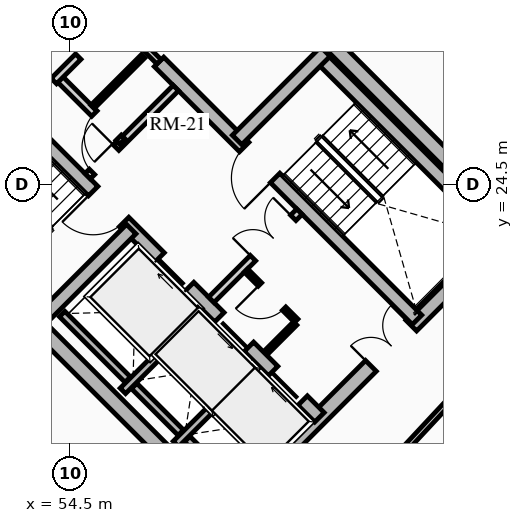
"""IFC4 building model, lengths in metres.
Left out: names, types, materials, properties, quantities, classifications, styles, units other than length and angle.
Written with IfcOpenShell. Run it as: python <this file> out.ifc"""

import sys

from ifc_helpers import new_model, si_unit, direction, frame, frame_2d, origin, place, context, subcontext, project, spatial, rectangle, extrude, source, transform, mapped, element, fill, save


model = new_model("IFC4")
c1 = context("Model", 3, precision=1e-05, world=origin(), true_north=direction((0.0, 1.0)))
c2 = subcontext(c1, "Body", "Model", "MODEL_VIEW")
j1 = project(units=[si_unit("LENGTHUNIT", "METRE"), si_unit("PLANEANGLEUNIT", "RADIAN")], contexts=[c1])
p1 = place(None, origin())
s1 = spatial("IfcSite", under=j1, at=p1, CompositionType="ELEMENT")
p2 = place(p1, origin())
s2 = spatial("IfcBuilding", under=s1, at=p2, CompositionType="ELEMENT")
p3 = place(p2, frame((0.0, 0.0, 226.05)))
s3 = spatial("IfcBuildingStorey", under=s2, at=p3, CompositionType="ELEMENT", Elevation=226.05)
for number, where, z_axis, x_axis in (
    (1, (58.702, 15.732, 0.0), (0.0, 0.0, 1.0), (-0.707, 0.707, 0.0)),
    (2, (66.268, 23.298, 0.0), (0.0, 0.0, 1.0), (-0.707, 0.707, 0.0)),
):
    element("IfcWall", number, at=place(p3, frame(where, z_axis=z_axis, x_axis=x_axis)), inside=s3, PredefinedType="SHEAR", context=c2, shape_type="SweptSolid", body=[
        extrude(rectangle(XDim=14.1, YDim=0.4, at=frame_2d((7.05, 0.0))), origin(), (0.0, 0.0, 1.0), 3.2),
    ])
p4 = place(p3, frame((58.561, 15.873, 0.0), z_axis=(0.0, 0.0, 1.0), x_axis=(0.707106781187, 0.707106781187, 0.0)))
e3 = element("IfcWall", 3, at=p4, inside=s3, PredefinedType="SHEAR", context=c2, shape_type="SweptSolid", body=[
    extrude(rectangle(XDim=10.7, YDim=0.4, at=frame_2d((5.35, 0.0))), origin(), (0.0, 0.0, 1.0), 3.2),
])
m1 = source(origin(), c2, "Body", "SweptSolid", [
    extrude(rectangle(XDim=1.5, YDim=2.02, at=frame_2d((0.75, 1.01))), frame((0.0, 0.21, 0.0), z_axis=(0.0, -1.0, 0.0), x_axis=(1.0, 0.0, 0.0)), (0.0, 0.0, 1.0), 0.42),
])
p5 = place(p4, frame((5.45, 0.0, 0.0)))
e4 = element("IfcOpeningElement", 4, at=p5, cuts=e3, PredefinedType="OPENING", context=c2, shape_type="MappedRepresentation", body=[
    mapped(m1, transform((0.0, 0.0, 0.0), x_axis=(1.0, 0.0, 0.0), y_axis=(0.0, 1.0, 0.0), z_axis=(0.0, 0.0, 1.0), scale=1.0)),
])
p6 = place(p3, frame((48.873, 25.561, 0.0), z_axis=(0.0, 0.0, 1.0), x_axis=(0.707106781187, 0.707106781187, 0.0)))
e5 = element("IfcWall", 5, at=p6, inside=s3, PredefinedType="SHEAR", context=c2, shape_type="SweptSolid", body=[
    extrude(rectangle(XDim=10.7, YDim=0.4, at=frame_2d((5.35, 0.0))), origin(), (0.0, 0.0, 1.0), 3.2),
])
p7 = place(p6, frame((4.6, 0.0, 0.0)))
e6 = element("IfcOpeningElement", 6, at=p7, cuts=e5, PredefinedType="OPENING", context=c2, shape_type="MappedRepresentation", body=[
    mapped(m1, transform((0.0, 0.0, 0.0), x_axis=(1.0, 0.0, 0.0), y_axis=(0.0, 1.0, 0.0), z_axis=(0.0, 0.0, 1.0), scale=1.0)),
])
p8 = place(p3, frame((61.06, 18.373, 0.0), z_axis=(0.0, 0.0, 1.0), x_axis=(-0.707106781187, 0.707106781187, 0.0)))
e7 = element("IfcWall", 7, at=p8, inside=s3, PredefinedType="SHEAR", context=c2, shape_type="SweptSolid", body=[
    extrude(rectangle(XDim=13.7, YDim=0.35, at=frame_2d((6.85, 0.0))), origin(), (0.0, 0.0, 1.0), 3.2),
])
m2 = source(origin(), c2, "Body", "SweptSolid", [
    extrude(rectangle(XDim=1.1, YDim=2.015, at=frame_2d((0.55, 1.007))), frame((0.0, 0.185, 0.0), z_axis=(0.0, -1.0, 0.0), x_axis=(1.0, 0.0, 0.0)), (0.0, 0.0, 1.0), 0.37),
])
p9 = place(p8, frame((4.85, 0.0, 0.0)))
e8 = element("IfcOpeningElement", 8, at=p9, cuts=e7, PredefinedType="OPENING", context=c2, shape_type="MappedRepresentation", body=[
    mapped(m2, transform((0.0, 0.0, 0.0), x_axis=(1.0, 0.0, 0.0), y_axis=(0.0, 1.0, 0.0), z_axis=(0.0, 0.0, 1.0), scale=1.0)),
])
p10 = place(p8, frame((0.625, 0.0, 0.0)))
e9 = element("IfcOpeningElement", 9, at=p10, cuts=e7, PredefinedType="OPENING", context=c2, shape_type="MappedRepresentation", body=[
    mapped(m2, transform((0.0, 0.0, 0.0), x_axis=(1.0, 0.0, 0.0), y_axis=(0.0, 1.0, 0.0), z_axis=(0.0, 0.0, 1.0), scale=1.0)),
])
p11 = place(p8, frame((2.625, 0.0, 0.0)))
e10 = element("IfcOpeningElement", 10, at=p11, cuts=e7, PredefinedType="OPENING", context=c2, shape_type="MappedRepresentation", body=[
    mapped(m2, transform((0.0, 0.0, 0.0), x_axis=(1.0, 0.0, 0.0), y_axis=(0.0, 1.0, 0.0), z_axis=(0.0, 0.0, 1.0), scale=1.0)),
])
m3 = source(origin(), c2, "Body", "SweptSolid", [
    extrude(rectangle(XDim=1.15, YDim=2.02, at=frame_2d((0.575, 1.01))), frame((0.0, 0.185, 0.0), z_axis=(0.0, -1.0, 0.0), x_axis=(1.0, 0.0, 0.0)), (0.0, 0.0, 1.0), 0.37),
])
p12 = place(p8, frame((7.27, 0.0, 0.0)))
e11 = element("IfcOpeningElement", 11, at=p12, cuts=e7, PredefinedType="OPENING", context=c2, shape_type="MappedRepresentation", body=[
    mapped(m3, transform((0.0, 0.0, 0.0), x_axis=(1.0, 0.0, 0.0), y_axis=(0.0, 1.0, 0.0), z_axis=(0.0, 0.0, 1.0), scale=1.0)),
])
p13 = place(p3, frame((63.627, 20.94, 0.0), z_axis=(0.0, 0.0, 1.0), x_axis=(-0.707119496762, 0.707094065383, 0.0)))
e12 = element("IfcWall", 12, at=p13, inside=s3, PredefinedType="SHEAR", context=c2, shape_type="SweptSolid", body=[
    extrude(rectangle(XDim=9.6, YDim=0.35, at=frame_2d((4.8, 0.0))), origin(), (0.0, 0.0, 1.0), 3.2),
])
p14 = place(p13, frame((5.28, 0.0, 0.0)))
e13 = element("IfcOpeningElement", 13, at=p14, cuts=e12, PredefinedType="OPENING", context=c2, shape_type="MappedRepresentation", body=[
    mapped(m3, transform((0.0, 0.0, 0.0), x_axis=(1.0, 0.0, 0.0), y_axis=(0.0, 1.0, 0.0), z_axis=(0.0, 0.0, 1.0), scale=1.0)),
])
p15 = place(p3, frame((53.922, 21.141, 0.0), z_axis=(0.0, 0.0, 1.0), x_axis=(-0.707106781187, 0.707106781187, 0.0)))
e14 = element("IfcWall", 14, at=p15, inside=s3, PredefinedType="SHEAR", context=c2, shape_type="SweptSolid", body=[
    extrude(rectangle(XDim=6.695, YDim=0.35, at=frame_2d((3.348, 0.0))), origin(), (0.0, 0.0, 1.0), 3.2),
])
p16 = place(p3, frame((53.784, 21.003, 0.0), z_axis=(0.0, 0.0, 1.0), x_axis=(0.707106781187, 0.707106781187, 0.0)))
e15 = element("IfcWall", 15, at=p16, inside=s3, PredefinedType="SHEAR", context=c2, shape_type="SweptSolid", body=[
    extrude(rectangle(XDim=3.285, YDim=0.35, at=frame_2d((1.643, 0.0))), origin(), (0.0, 0.0, 1.0), 3.2),
])
p17 = place(p3, frame((65.812, 23.125, 0.0), z_axis=(0.0, 0.0, 1.0), x_axis=(-0.707106781187, 0.707106781187, 0.0)))
e16 = element("IfcWall", 16, at=p17, inside=s3, PredefinedType="SHEAR", context=c2, shape_type="SweptSolid", body=[
    extrude(rectangle(XDim=6.695, YDim=0.35, at=frame_2d((3.348, 0.0))), origin(), (0.0, 0.0, 1.0), 3.2),
])
p18 = place(p3, frame((58.893, 25.674, 0.0), z_axis=(0.0, 0.0, 1.0), x_axis=(0.707106781187, 0.707106781187, 0.0)))
e17 = element("IfcWall", 17, at=p18, inside=s3, PredefinedType="SHEAR", context=c2, shape_type="SweptSolid", body=[
    extrude(rectangle(XDim=3.285, YDim=0.35, at=frame_2d((1.643, 0.0))), origin(), (0.0, 0.0, 1.0), 3.2),
])
p19 = place(p3, frame((55.888, 19.069, 0.0), z_axis=(0.0, 0.0, 1.0), x_axis=(0.707106781187, 0.707106781187, 0.0)))
e18 = element("IfcWall", 18, at=p19, inside=s3, PredefinedType="SHEAR", context=c2, shape_type="SweptSolid", body=[
    extrude(rectangle(XDim=2.97, YDim=0.2, at=frame_2d((1.485, 0.0))), origin(), (0.0, 0.0, 1.0), 3.2),
])
p20 = place(p3, frame((56.015, 19.366, 0.0), z_axis=(0.0, 0.0, 1.0), x_axis=(-0.707106781187, 0.707106781187, 0.0)))
e19 = element("IfcWall", 19, at=p20, inside=s3, PredefinedType="SHEAR", context=c2, shape_type="SweptSolid", body=[
    extrude(rectangle(XDim=2.44, YDim=0.2, at=frame_2d((1.22, 0.0))), origin(), (0.0, 0.0, 1.0), 3.2),
])
p21 = place(p3, frame((57.284, 17.673, 0.0), z_axis=(0.0, 0.0, 1.0), x_axis=(0.707147878904, 0.70706568108, 0.0)))
e20 = element("IfcWall", 20, at=p21, inside=s3, PredefinedType="SHEAR", context=c2, shape_type="SweptSolid", body=[
    extrude(rectangle(XDim=2.97, YDim=0.2, at=frame_2d((1.485, 0.0))), origin(), (0.0, 0.0, 1.0), 3.2),
])
p22 = place(p3, frame((57.412, 17.97, 0.0), z_axis=(0.0, 0.0, 1.0), x_axis=(-0.707106781187, 0.707106781187, 0.0)))
e21 = element("IfcWall", 21, at=p22, inside=s3, PredefinedType="SHEAR", context=c2, shape_type="SweptSolid", body=[
    extrude(rectangle(XDim=1.735, YDim=0.2, at=frame_2d((0.867, 0.0))), origin(), (0.0, 0.0, 1.0), 3.2),
])
p23 = place(p3, frame((58.737, 16.644, 0.0), z_axis=(0.0, 0.0, 1.0), x_axis=(-0.707032117043, 0.707181437447, 0.0)))
e22 = element("IfcWall", 22, at=p23, inside=s3, PredefinedType="SHEAR", context=c2, shape_type="SweptSolid", body=[
    extrude(rectangle(XDim=1.635, YDim=0.2, at=frame_2d((0.817, 0.0))), origin(), (0.0, 0.0, 1.0), 3.2),
])
p24 = place(p3, frame((58.214, 21.467, 0.0), z_axis=(0.0, 0.0, 1.0), x_axis=(0.707106781187, 0.707106781187, 0.0)))
e23 = element("IfcWall", 23, at=p24, inside=s3, PredefinedType="PARTITIONING", context=c2, shape_type="SweptSolid", body=[
    extrude(rectangle(XDim=3.28, YDim=0.2, at=frame_2d((1.64, 0.0))), origin(), (0.0, 0.0, 1.0), 2.975),
])
m4 = source(origin(), c2, "Body", "SweptSolid", [
    extrude(rectangle(XDim=1.5, YDim=2.02, at=frame_2d((0.75, 1.01))), frame((0.0, 0.11, 0.0), z_axis=(0.0, -1.0, 0.0), x_axis=(1.0, 0.0, 0.0)), (0.0, 0.0, 1.0), 0.22),
])
p25 = place(p24, frame((1.55, 0.0, 0.0)))
e24 = element("IfcOpeningElement", 24, at=p25, cuts=e23, PredefinedType="OPENING", context=c2, shape_type="MappedRepresentation", body=[
    mapped(m4, transform((0.0, 0.0, 0.0), x_axis=(1.0, 0.0, 0.0), y_axis=(0.0, 1.0, 0.0), z_axis=(0.0, 0.0, 1.0), scale=1.0)),
])
p26 = place(p3, frame((54.961, 24.719, 0.0), z_axis=(0.0, 0.0, 1.0), x_axis=(0.707106781187, 0.707106781187, 0.0)))
e25 = element("IfcWall", 25, at=p26, inside=s3, PredefinedType="PARTITIONING", context=c2, shape_type="SweptSolid", body=[
    extrude(rectangle(XDim=3.28, YDim=0.2, at=frame_2d((1.64, 0.0))), origin(), (0.0, 0.0, 1.0), 2.975),
])
m5 = source(origin(), c2, "Body", "SweptSolid", [
    extrude(rectangle(XDim=0.9, YDim=2.005, at=frame_2d((0.45, 1.002))), frame((0.0, 0.11, 0.0), z_axis=(0.0, -1.0, 0.0), x_axis=(1.0, 0.0, 0.0)), (0.0, 0.0, 1.0), 0.22),
])
p27 = place(p26, frame((0.16, 0.0, 0.0)))
e26 = element("IfcOpeningElement", 26, at=p27, cuts=e25, PredefinedType="OPENING", context=c2, shape_type="MappedRepresentation", body=[
    mapped(m5, transform((0.0, 0.0, 0.0), x_axis=(1.0, 0.0, 0.0), y_axis=(0.0, 1.0, 0.0), z_axis=(0.0, 0.0, 1.0), scale=1.0)),
])
p28 = place(p3, frame((55.874, 25.631, 0.0), z_axis=(0.0, 0.0, 1.0), x_axis=(-0.707157639372, 0.707055919343, 0.0)))
e27 = element("IfcWall", 27, at=p28, inside=s3, PredefinedType="PARTITIONING", context=c2, shape_type="SweptSolid", body=[
    extrude(rectangle(XDim=2.4, YDim=0.2, at=frame_2d((1.2, 0.0))), origin(), (0.0, 0.0, 1.0), 2.975),
])
p29 = place(p28, frame((0.14, 0.0, 0.0)))
e28 = element("IfcOpeningElement", 28, at=p29, cuts=e27, PredefinedType="OPENING", context=c2, shape_type="MappedRepresentation", body=[
    mapped(m5, transform((0.0, 0.0, 0.0), x_axis=(1.0, 0.0, 0.0), y_axis=(0.0, 1.0, 0.0), z_axis=(0.0, 0.0, 1.0), scale=1.0)),
])
p30 = place(p3, frame((53.264, 26.416, 0.0), z_axis=(0.0, 0.0, 1.0), x_axis=(0.707106781187, 0.707106781187, 0.0)))
e29 = element("IfcWall", 29, at=p30, inside=s3, PredefinedType="PARTITIONING", context=c2, shape_type="SweptSolid", body=[
    extrude(rectangle(XDim=3.28, YDim=0.2, at=frame_2d((1.64, 0.0))), origin(), (0.0, 0.0, 1.0), 2.975),
])
m6 = source(origin(), c2, "Body", "SweptSolid", [
    extrude(rectangle(XDim=1.0, YDim=2.015, at=frame_2d((0.5, 1.007))), frame((0.0, 0.11, 0.0), z_axis=(0.0, -1.0, 0.0), x_axis=(1.0, 0.0, 0.0)), (0.0, 0.0, 1.0), 0.22),
])
p31 = place(p30, frame((0.14, 0.0, 0.0)))
e30 = element("IfcOpeningElement", 30, at=p31, cuts=e29, PredefinedType="OPENING", context=c2, shape_type="MappedRepresentation", body=[
    mapped(m6, transform((0.0, 0.0, 0.0), x_axis=(1.0, 0.0, 0.0), y_axis=(0.0, 1.0, 0.0), z_axis=(0.0, 0.0, 1.0), scale=1.0)),
])
p32 = place(p30, frame((2.05, 0.0, 0.0)))
e31 = element("IfcOpeningElement", 31, at=p32, cuts=e29, PredefinedType="OPENING", context=c2, shape_type="MappedRepresentation", body=[
    mapped(m5, transform((0.0, 0.0, 0.0), x_axis=(1.0, 0.0, 0.0), y_axis=(0.0, 1.0, 0.0), z_axis=(0.0, 0.0, 1.0), scale=1.0)),
])
p33 = place(p3, frame((60.448, 20.915, 0.0), z_axis=(0.0, 0.0, 1.0), x_axis=(-0.707106781187, 0.707106781187, 0.0)))
e32 = element("IfcWall", 32, at=p33, inside=s3, PredefinedType="PARTITIONING", context=c2, shape_type="SweptSolid", body=[
    extrude(rectangle(XDim=1.87, YDim=0.125, at=frame_2d((0.935, 0.0))), origin(), (0.0, 0.0, 1.0), 2.975),
])
m7 = source(origin(), c2, "Body", "SweptSolid", [
    extrude(rectangle(XDim=0.9, YDim=2.005, at=frame_2d((0.45, 1.002))), frame((0.0, 0.073, 0.0), z_axis=(0.0, -1.0, 0.0), x_axis=(1.0, 0.0, 0.0)), (0.0, 0.0, 1.0), 0.145),
])
p34 = place(p33, frame((0.45, 0.0, 0.0)))
e33 = element("IfcOpeningElement", 33, at=p34, cuts=e32, PredefinedType="OPENING", context=c2, shape_type="MappedRepresentation", body=[
    mapped(m7, transform((0.0, 0.0, 0.0), x_axis=(1.0, 0.0, 0.0), y_axis=(0.0, 1.0, 0.0), z_axis=(0.0, 0.0, 1.0), scale=1.0)),
])
p35 = place(p3, frame((59.643, 20.066, 0.0), z_axis=(0.0, 0.0, 1.0), x_axis=(0.707106781187, 0.707106781187, 0.0)))
e34 = element("IfcWall", 34, at=p35, inside=s3, PredefinedType="PARTITIONING", context=c2, shape_type="SweptSolid", body=[
    extrude(rectangle(XDim=1.1, YDim=0.125, at=frame_2d((0.55, 0.0))), origin(), (0.0, 0.0, 1.0), 2.975),
])
p36 = place(p3, frame((55.089, 26.543, 0.0), z_axis=(0.0, 0.0, 1.0), x_axis=(0.707106781187, 0.707106781187, 0.0)))
e35 = element("IfcWall", 35, at=p36, inside=s3, PredefinedType="PARTITIONING", context=c2, shape_type="SweptSolid", body=[
    extrude(rectangle(XDim=1.88, YDim=0.125, at=frame_2d((0.94, 0.0))), origin(), (0.0, 0.0, 1.0), 2.975),
])
p37 = place(p3, frame((56.839, 27.728, 0.0), z_axis=(0.0, 0.0, 1.0), x_axis=(-0.707106781187, 0.707106781187, 0.0)))
e36 = element("IfcWall", 36, at=p37, inside=s3, PredefinedType="PARTITIONING", context=c2, shape_type="SweptSolid", body=[
    extrude(rectangle(XDim=3.9, YDim=0.16, at=frame_2d((1.95, 0.0))), origin(), (0.0, 0.0, 1.0), 2.975),
])
m8 = source(origin(), c2, "Body", "SweptSolid", [
    extrude(rectangle(XDim=0.9, YDim=2.005, at=frame_2d((0.45, 1.002))), frame((0.0, 0.09, 0.0), z_axis=(0.0, -1.0, 0.0), x_axis=(1.0, 0.0, 0.0)), (0.0, 0.0, 1.0), 0.18),
])
p38 = place(p37, frame((2.2, 0.0, 0.0)))
e37 = element("IfcOpeningElement", 37, at=p38, cuts=e36, PredefinedType="OPENING", context=c2, shape_type="MappedRepresentation", body=[
    mapped(m8, transform((0.0, 0.0, 0.0), x_axis=(1.0, 0.0, 0.0), y_axis=(0.0, 1.0, 0.0), z_axis=(0.0, 0.0, 1.0), scale=1.0)),
])
p39 = place(p3, frame((52.126, 19.126, 0.0), z_axis=(0.0, 0.0, 1.0), x_axis=(0.698979087027, -0.715142108884, 0.0)))
e38 = element("IfcWall", 38, at=p39, inside=s3, PredefinedType="PARTITIONING", context=c2, shape_type="SweptSolid", body=[
    extrude(rectangle(XDim=5.966, YDim=0.15, at=frame_2d((2.983, 0.0))), origin(), (0.0, 0.0, 1.0), 2.612),
])
p40 = place(p3, frame((62.736, 16.924, 0.0), z_axis=(0.0, 0.0, 1.0), x_axis=(0.681946700833, 0.731401871219, 0.0)))
e39 = element("IfcWall", 39, at=p40, inside=s3, PredefinedType="PARTITIONING", context=c2, shape_type="SweptSolid", body=[
    extrude(rectangle(XDim=6.393, YDim=0.15, at=frame_2d((3.196, 0.0))), origin(), (0.0, 0.0, 1.0), 2.545),
])
p41 = place(p3, frame((51.134, 18.134, 0.0), z_axis=(0.0, 0.0, 1.0), x_axis=(0.722450775654, -0.691422357721, 0.0)))
e40 = element("IfcWall", 40, at=p41, inside=s3, PredefinedType="PARTITIONING", context=c2, shape_type="SweptSolid", body=[
    extrude(rectangle(XDim=5.634, YDim=0.125, at=frame_2d((2.817, 0.0))), origin(), (0.0, 0.0, 1.0), 2.612),
])
p42 = place(p41, frame((2.367, 0.0, 0.0)))
e41 = element("IfcOpeningElement", 41, at=p42, cuts=e40, PredefinedType="OPENING", context=c2, shape_type="MappedRepresentation", body=[
    mapped(m7, transform((0.0, 0.0, 0.0), x_axis=(1.0, 0.0, 0.0), y_axis=(0.0, 1.0, 0.0), z_axis=(0.0, 0.0, 1.0), scale=1.0)),
])
m9 = source(origin(), c2, "Body", "SweptSolid", [
    extrude(rectangle(XDim=1.1, YDim=2.015, at=frame_2d((0.55, 1.007))), frame((0.0, 0.025, 0.0), z_axis=(0.0, -1.0, 0.0), x_axis=(1.0, 0.0, 0.0)), (0.0, 0.0, 1.0), 0.05),
])
p43 = place(p9, origin())
e42 = element("IfcDoor", 42, at=p43, inside=s3, OperationType="SLIDING_TO_RIGHT", PredefinedType="DOOR", context=c2, shape_type="MappedRepresentation", body=[
    mapped(m9, transform((0.0, 0.0, 0.0), x_axis=(1.0, 0.0, 0.0), y_axis=(0.0, 1.0, 0.0), z_axis=(0.0, 0.0, 1.0), scale=1.0)),
])
fill(e8, e42)
p44 = place(p10, origin())
e43 = element("IfcDoor", 43, at=p44, inside=s3, OperationType="SLIDING_TO_RIGHT", PredefinedType="DOOR", context=c2, shape_type="MappedRepresentation", body=[
    mapped(m9, transform((0.0, 0.0, 0.0), x_axis=(1.0, 0.0, 0.0), y_axis=(0.0, 1.0, 0.0), z_axis=(0.0, 0.0, 1.0), scale=1.0)),
])
fill(e9, e43)
p45 = place(p11, origin())
e44 = element("IfcDoor", 44, at=p45, inside=s3, OperationType="SLIDING_TO_LEFT", PredefinedType="DOOR", context=c2, shape_type="MappedRepresentation", body=[
    mapped(m9, transform((0.0, 0.0, 0.0), x_axis=(1.0, 0.0, 0.0), y_axis=(0.0, 1.0, 0.0), z_axis=(0.0, 0.0, 1.0), scale=1.0)),
])
fill(e10, e44)
m10 = source(origin(), c2, "Body", "SweptSolid", [
    extrude(rectangle(XDim=1.15, YDim=2.02, at=frame_2d((0.575, 1.01))), frame((0.0, 0.025, 0.0), z_axis=(0.0, -1.0, 0.0), x_axis=(1.0, 0.0, 0.0)), (0.0, 0.0, 1.0), 0.05),
])
p46 = place(p12, origin())
e45 = element("IfcDoor", 45, at=p46, inside=s3, OperationType="SINGLE_SWING_RIGHT", PredefinedType="DOOR", context=c2, shape_type="MappedRepresentation", body=[
    mapped(m10, transform((0.0, 0.0, 0.0), x_axis=(1.0, 0.0, 0.0), y_axis=(0.0, 1.0, 0.0), z_axis=(0.0, 0.0, 1.0), scale=1.0)),
])
fill(e11, e45)
p47 = place(p14, origin())
e46 = element("IfcDoor", 46, at=p47, inside=s3, OperationType="SINGLE_SWING_LEFT", PredefinedType="DOOR", context=c2, shape_type="MappedRepresentation", body=[
    mapped(m10, transform((0.0, 0.0, 0.0), x_axis=(1.0, 0.0, 0.0), y_axis=(0.0, 1.0, 0.0), z_axis=(0.0, 0.0, 1.0), scale=1.0)),
])
fill(e13, e46)
m11 = source(origin(), c2, "Body", "SweptSolid", [
    extrude(rectangle(XDim=1.5, YDim=2.02, at=frame_2d((0.75, 1.01))), frame((0.0, 0.025, 0.0), z_axis=(0.0, -1.0, 0.0), x_axis=(1.0, 0.0, 0.0)), (0.0, 0.0, 1.0), 0.05),
])
p48 = place(p5, origin())
e47 = element("IfcDoor", 47, at=p48, inside=s3, OperationType="DOUBLE_DOOR_SINGLE_SWING", PredefinedType="DOOR", context=c2, shape_type="MappedRepresentation", body=[
    mapped(m11, transform((0.0, 0.0, 0.0), x_axis=(1.0, 0.0, 0.0), y_axis=(0.0, 1.0, 0.0), z_axis=(0.0, 0.0, 1.0), scale=1.0)),
])
fill(e4, e47)
p49 = place(p25, origin())
e48 = element("IfcDoor", 48, at=p49, inside=s3, OperationType="DOUBLE_DOOR_SINGLE_SWING", PredefinedType="DOOR", context=c2, shape_type="MappedRepresentation", body=[
    mapped(m11, transform((0.0, 0.0, 0.0), x_axis=(1.0, 0.0, 0.0), y_axis=(0.0, 1.0, 0.0), z_axis=(0.0, 0.0, 1.0), scale=1.0)),
])
fill(e24, e48)
m12 = source(origin(), c2, "Body", "SweptSolid", [
    extrude(rectangle(XDim=0.9, YDim=2.005, at=frame_2d((0.45, 1.002))), frame((0.0, 0.025, 0.0), z_axis=(0.0, -1.0, 0.0), x_axis=(1.0, 0.0, 0.0)), (0.0, 0.0, 1.0), 0.05),
])
p50 = place(p27, origin())
e49 = element("IfcDoor", 49, at=p50, inside=s3, OperationType="SINGLE_SWING_RIGHT", PredefinedType="DOOR", context=c2, shape_type="MappedRepresentation", body=[
    mapped(m12, transform((0.0, 0.0, 0.0), x_axis=(1.0, 0.0, 0.0), y_axis=(0.0, 1.0, 0.0), z_axis=(0.0, 0.0, 1.0), scale=1.0)),
])
fill(e26, e49)
m13 = source(origin(), c2, "Body", "SweptSolid", [
    extrude(rectangle(XDim=1.0, YDim=2.015, at=frame_2d((0.5, 1.007))), frame((0.0, 0.025, 0.0), z_axis=(0.0, -1.0, 0.0), x_axis=(1.0, 0.0, 0.0)), (0.0, 0.0, 1.0), 0.05),
])
p51 = place(p31, origin())
e50 = element("IfcDoor", 50, at=p51, inside=s3, OperationType="SINGLE_SWING_LEFT", PredefinedType="DOOR", context=c2, shape_type="MappedRepresentation", body=[
    mapped(m13, transform((0.0, 0.0, 0.0), x_axis=(1.0, 0.0, 0.0), y_axis=(0.0, 1.0, 0.0), z_axis=(0.0, 0.0, 1.0), scale=1.0)),
])
fill(e30, e50)
p52 = place(p34, origin())
e51 = element("IfcDoor", 51, at=p52, inside=s3, OperationType="SINGLE_SWING_RIGHT", PredefinedType="DOOR", context=c2, shape_type="MappedRepresentation", body=[
    mapped(m12, transform((0.0, 0.0, 0.0), x_axis=(1.0, 0.0, 0.0), y_axis=(0.0, 1.0, 0.0), z_axis=(0.0, 0.0, 1.0), scale=1.0)),
])
fill(e33, e51)
p53 = place(p29, origin())
e52 = element("IfcDoor", 52, at=p53, inside=s3, OperationType="SINGLE_SWING_LEFT", PredefinedType="DOOR", context=c2, shape_type="MappedRepresentation", body=[
    mapped(m12, transform((0.0, 0.0, 0.0), x_axis=(1.0, 0.0, 0.0), y_axis=(0.0, 1.0, 0.0), z_axis=(0.0, 0.0, 1.0), scale=1.0)),
])
fill(e28, e52)
p54 = place(p32, origin())
e53 = element("IfcDoor", 53, at=p54, inside=s3, OperationType="SINGLE_SWING_RIGHT", PredefinedType="DOOR", context=c2, shape_type="MappedRepresentation", body=[
    mapped(m12, transform((0.0, 0.0, 0.0), x_axis=(1.0, 0.0, 0.0), y_axis=(0.0, 1.0, 0.0), z_axis=(0.0, 0.0, 1.0), scale=1.0)),
])
fill(e31, e53)
save(model, sys.argv[1])
